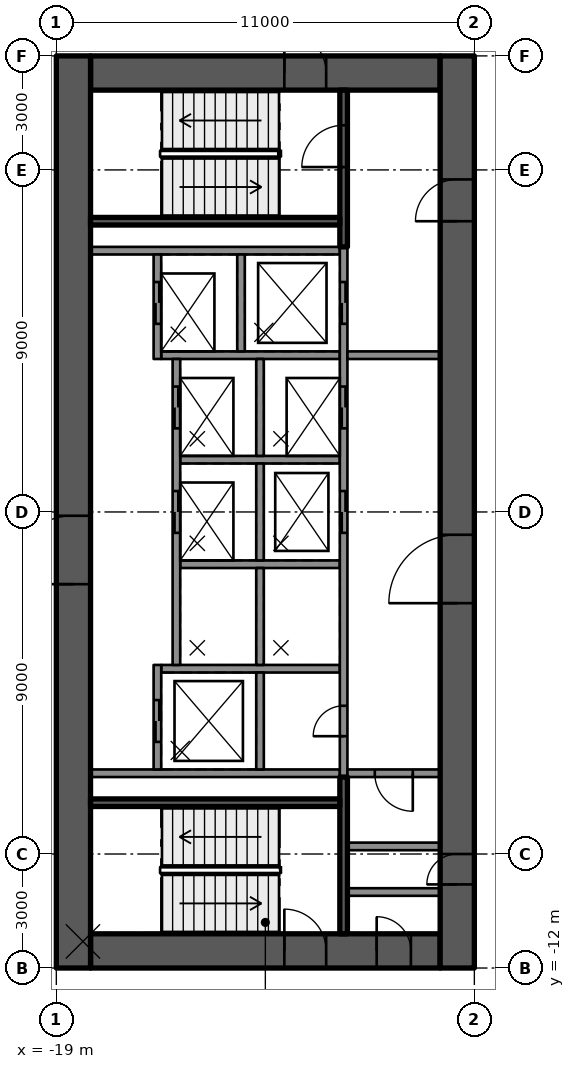
"""IFC4 building model, lengths in metres.
Left out: names, types, materials, properties, quantities, classifications, styles, units other than length and angle.
Written with IfcOpenShell. Run it as: python <this file> out.ifc"""

import sys

from ifc_helpers import new_model, si_unit, direction, frame, frame_2d, origin, place, context, subcontext, project, spatial, rectangle, extrude, element, fill, save


model = new_model("IFC4")
c1 = context("Model", 3, precision=1e-05, world=origin(), true_north=direction((0.0, 1.0)))
c2 = subcontext(c1, "Body", "Model", "MODEL_VIEW")
j1 = project(units=[si_unit("LENGTHUNIT", "METRE"), si_unit("PLANEANGLEUNIT", "RADIAN")], contexts=[c1])
p1 = place(None, origin())
s1 = spatial("IfcSite", under=j1, at=p1, CompositionType="ELEMENT")
p2 = place(p1, origin())
s2 = spatial("IfcBuilding", under=s1, at=p2, CompositionType="ELEMENT")
p3 = place(p2, frame((0.0, 0.0, 54.8)))
s3 = spatial("IfcBuildingStorey", under=s2, at=p3, CompositionType="ELEMENT", Elevation=54.8)
p4 = place(p3, frame((-18.1, 11.55, 0.0), z_axis=(0.0, 0.0, 1.0), x_axis=(1.0, 0.0, 0.0)))
e1 = element("IfcWall", 1, at=p4, inside=s3, PredefinedType="SHEAR", context=c2, shape_type="SweptSolid", body=[
    extrude(rectangle(XDim=9.2, YDim=0.9, at=frame_2d((4.6, 0.0))), origin(), (0.0, 0.0, 1.0), 4.0),
])
p5 = place(p4, frame((5.1, 0.0, 0.0)))
e2 = element("IfcOpeningElement", 2, at=p5, cuts=e1, PredefinedType="OPENING", context=c2, shape_type="SweptSolid", body=[
    extrude(rectangle(XDim=1.1, YDim=2.1, at=frame_2d((0.55, 1.05))), frame((0.0, 0.46, 0.0), z_axis=(0.0, -1.0, 0.0), x_axis=(1.0, 0.0, 0.0)), (0.0, 0.0, 1.0), 0.92),
])
p6 = place(p3, frame((-18.1, -11.55, 0.0), z_axis=(0.0, 0.0, 1.0), x_axis=(1.0, 0.0, 0.0)))
e3 = element("IfcWall", 3, at=p6, inside=s3, PredefinedType="SHEAR", context=c2, shape_type="SweptSolid", body=[
    extrude(rectangle(XDim=9.2, YDim=0.9, at=frame_2d((4.6, 0.0))), origin(), (0.0, 0.0, 1.0), 4.0),
])
p7 = place(p6, frame((5.1, 0.0, 0.0)))
e4 = element("IfcOpeningElement", 4, at=p7, cuts=e3, PredefinedType="OPENING", context=c2, shape_type="SweptSolid", body=[
    extrude(rectangle(XDim=1.1, YDim=2.1, at=frame_2d((0.55, 1.05))), frame((0.0, 0.46, 0.0), z_axis=(0.0, -1.0, 0.0), x_axis=(1.0, 0.0, 0.0)), (0.0, 0.0, 1.0), 0.92),
])
p8 = place(p6, frame((7.53, 0.0, 0.0)))
e5 = element("IfcOpeningElement", 5, at=p8, cuts=e3, PredefinedType="OPENING", context=c2, shape_type="SweptSolid", body=[
    extrude(rectangle(XDim=0.9, YDim=2.1, at=frame_2d((0.45, 1.05))), frame((0.0, 0.46, 0.0), z_axis=(0.0, -1.0, 0.0), x_axis=(1.0, 0.0, 0.0)), (0.0, 0.0, 1.0), 0.92),
])
p9 = place(p3, frame((-18.55, -12.0, 0.0), z_axis=(0.0, 0.0, 1.0), x_axis=(0.0, 1.0, 0.0)))
e6 = element("IfcWall", 6, at=p9, inside=s3, PredefinedType="SHEAR", context=c2, shape_type="SweptSolid", body=[
    extrude(rectangle(XDim=24.0, YDim=0.9, at=frame_2d((12.0, 0.0))), origin(), (0.0, 0.0, 1.0), 4.0),
])
p10 = place(p9, frame((10.1, 0.0, 0.0)))
e7 = element("IfcOpeningElement", 7, at=p10, cuts=e6, PredefinedType="OPENING", context=c2, shape_type="SweptSolid", body=[
    extrude(rectangle(XDim=1.8, YDim=2.1, at=frame_2d((0.9, 1.05))), frame((0.0, 0.46, 0.0), z_axis=(0.0, -1.0, 0.0), x_axis=(1.0, 0.0, 0.0)), (0.0, 0.0, 1.0), 0.92),
])
p11 = place(p3, frame((-8.45, -12.0, 0.0), z_axis=(0.0, 0.0, 1.0), x_axis=(0.0, 1.0, 0.0)))
e8 = element("IfcWall", 8, at=p11, inside=s3, PredefinedType="SHEAR", context=c2, shape_type="SweptSolid", body=[
    extrude(rectangle(XDim=24.0, YDim=0.9, at=frame_2d((12.0, 0.0))), origin(), (0.0, 0.0, 1.0), 4.0),
])
p12 = place(p11, frame((9.6, 0.0, 0.0)))
e9 = element("IfcOpeningElement", 9, at=p12, cuts=e8, PredefinedType="OPENING", context=c2, shape_type="SweptSolid", body=[
    extrude(rectangle(XDim=1.8, YDim=2.1, at=frame_2d((0.9, 1.05))), frame((0.0, 0.46, 0.0), z_axis=(0.0, -1.0, 0.0), x_axis=(1.0, 0.0, 0.0)), (0.0, 0.0, 1.0), 0.92),
])
p13 = place(p11, frame((19.65, 0.0, 0.0)))
e10 = element("IfcOpeningElement", 10, at=p13, cuts=e8, PredefinedType="OPENING", context=c2, shape_type="SweptSolid", body=[
    extrude(rectangle(XDim=1.1, YDim=2.1, at=frame_2d((0.55, 1.05))), frame((0.0, 0.46, 0.0), z_axis=(0.0, -1.0, 0.0), x_axis=(1.0, 0.0, 0.0)), (0.0, 0.0, 1.0), 0.92),
])
p14 = place(p11, frame((2.2, 0.0, 0.0)))
e11 = element("IfcOpeningElement", 11, at=p14, cuts=e8, PredefinedType="OPENING", context=c2, shape_type="SweptSolid", body=[
    extrude(rectangle(XDim=0.8, YDim=2.1, at=frame_2d((0.4, 1.05))), frame((0.0, 0.46, 0.0), z_axis=(0.0, -1.0, 0.0), x_axis=(1.0, 0.0, 0.0)), (0.0, 0.0, 1.0), 0.92),
])
for number, where, z_axis, x_axis in (
    (12, (-11.54, 6.875, 0.0), (0.0, 0.0, 1.0), (-1.0, 0.0, 0.0)),
    (13, (-11.54, -6.875, 0.0), (0.0, 0.0, 1.0), (-1.0, 0.0, 0.0)),
):
    element("IfcWall", number, at=place(p3, frame(where, z_axis=z_axis, x_axis=x_axis)), inside=s3, PredefinedType="SOLIDWALL", context=c2, shape_type="SweptSolid", body=[
        extrude(rectangle(XDim=6.56, YDim=0.2, at=frame_2d((3.28, 0.0))), origin(), (0.0, 0.0, 1.0), 3.59),
    ])
p15 = place(p3, frame((-11.54, -4.125, 0.0), z_axis=(0.0, 0.0, 1.0), x_axis=(-1.0, 0.0, 0.0)))
e14 = element("IfcWall", 14, at=p15, inside=s3, PredefinedType="SOLIDWALL", context=c2, shape_type="SweptSolid", body=[
    extrude(rectangle(XDim=4.7, YDim=0.2, at=frame_2d((2.35, 0.0))), origin(), (0.0, 0.0, 1.0), 3.59),
])
for number, where, z_axis, x_axis in (
    (15, (-11.54, -1.375, 0.0), (0.0, 0.0, 1.0), (-1.0, 0.0, 0.0)),
    (16, (-11.54, 1.375, 0.0), (0.0, 0.0, 1.0), (-1.0, 0.0, 0.0)),
):
    element("IfcWall", number, at=place(p3, frame(where, z_axis=z_axis, x_axis=x_axis)), inside=s3, PredefinedType="SOLIDWALL", context=c2, shape_type="SweptSolid", body=[
        extrude(rectangle(XDim=4.2, YDim=0.2, at=frame_2d((2.1, 0.0))), origin(), (0.0, 0.0, 1.0), 3.59),
    ])
p16 = place(p3, frame((-11.54, 4.125, 0.0), z_axis=(0.0, 0.0, 1.0), x_axis=(-1.0, 0.0, 0.0)))
e17 = element("IfcWall", 17, at=p16, inside=s3, PredefinedType="SOLIDWALL", context=c2, shape_type="SweptSolid", body=[
    extrude(rectangle(XDim=4.7, YDim=0.2, at=frame_2d((2.35, 0.0))), origin(), (0.0, 0.0, 1.0), 3.59),
])
p17 = place(p3, frame((-11.44, -6.975, 0.0), z_axis=(0.0, 0.0, 1.0), x_axis=(0.0, 1.0, 0.0)))
e18 = element("IfcWall", 18, at=p17, inside=s3, PredefinedType="SOLIDWALL", context=c2, shape_type="SweptSolid", body=[
    extrude(rectangle(XDim=13.95, YDim=0.2, at=frame_2d((6.975, 0.0))), origin(), (0.0, 0.0, 1.0), 3.59),
])
p18 = place(p17, frame((6.425, 0.0, 0.0)))
e19 = element("IfcOpeningElement", 19, at=p18, cuts=e18, PredefinedType="OPENING", context=c2, shape_type="SweptSolid", body=[
    extrude(rectangle(XDim=1.1, YDim=2.1, at=frame_2d((0.55, 1.05))), frame((0.0, 0.11, 0.0), z_axis=(0.0, -1.0, 0.0), x_axis=(1.0, 0.0, 0.0)), (0.0, 0.0, 1.0), 0.22),
])
p19 = place(p17, frame((9.175, 0.0, 0.0)))
e20 = element("IfcOpeningElement", 20, at=p19, cuts=e18, PredefinedType="OPENING", context=c2, shape_type="SweptSolid", body=[
    extrude(rectangle(XDim=1.1, YDim=2.1, at=frame_2d((0.55, 1.05))), frame((0.0, 0.11, 0.0), z_axis=(0.0, -1.0, 0.0), x_axis=(1.0, 0.0, 0.0)), (0.0, 0.0, 1.0), 0.22),
])
p20 = place(p17, frame((11.925, 0.0, 0.0)))
e21 = element("IfcOpeningElement", 21, at=p20, cuts=e18, PredefinedType="OPENING", context=c2, shape_type="SweptSolid", body=[
    extrude(rectangle(XDim=1.1, YDim=2.1, at=frame_2d((0.55, 1.05))), frame((0.0, 0.11, 0.0), z_axis=(0.0, -1.0, 0.0), x_axis=(1.0, 0.0, 0.0)), (0.0, 0.0, 1.0), 0.22),
])
p21 = place(p17, frame((1.075, 0.0, 0.0)))
e22 = element("IfcOpeningElement", 22, at=p21, cuts=e18, PredefinedType="OPENING", context=c2, shape_type="SweptSolid", body=[
    extrude(rectangle(XDim=0.8, YDim=2.1, at=frame_2d((0.4, 1.05))), frame((0.0, 0.11, 0.0), z_axis=(0.0, -1.0, 0.0), x_axis=(1.0, 0.0, 0.0)), (0.0, 0.0, 1.0), 0.22),
])
for number, where, z_axis, x_axis in (
    (23, (-13.64, -6.775, 0.0), (0.0, 0.0, 1.0), (0.0, 1.0, 0.0)),
    (24, (-13.64, -4.025, 0.0), (0.0, 0.0, 1.0), (0.0, 1.0, 0.0)),
    (25, (-13.64, -1.275, 0.0), (0.0, 0.0, 1.0), (0.0, 1.0, 0.0)),
    (26, (-13.64, 1.475, 0.0), (0.0, 0.0, 1.0), (0.0, 1.0, 0.0)),
    (27, (-14.14, 4.225, 0.0), (0.0, 0.0, 1.0), (0.0, 1.0, 0.0)),
):
    element("IfcWall", number, at=place(p3, frame(where, z_axis=z_axis, x_axis=x_axis)), inside=s3, PredefinedType="SOLIDWALL", context=c2, shape_type="SweptSolid", body=[
        extrude(rectangle(XDim=2.55, YDim=0.2, at=frame_2d((1.275, 0.0))), origin(), (0.0, 0.0, 1.0), 3.59),
    ])
p22 = place(p3, frame((-16.34, -6.775, 0.0), z_axis=(0.0, 0.0, 1.0), x_axis=(0.0, 1.0, 0.0)))
e28 = element("IfcWall", 28, at=p22, inside=s3, PredefinedType="SOLIDWALL", context=c2, shape_type="SweptSolid", body=[
    extrude(rectangle(XDim=2.75, YDim=0.2, at=frame_2d((1.375, 0.0))), origin(), (0.0, 0.0, 1.0), 3.59),
])
p23 = place(p22, frame((0.725, 0.0, 0.0)))
e29 = element("IfcOpeningElement", 29, at=p23, cuts=e28, PredefinedType="OPENING", context=c2, shape_type="SweptSolid", body=[
    extrude(rectangle(XDim=1.1, YDim=2.1, at=frame_2d((0.55, 1.05))), frame((0.0, 0.11, 0.0), z_axis=(0.0, -1.0, 0.0), x_axis=(1.0, 0.0, 0.0)), (0.0, 0.0, 1.0), 0.22),
])
p24 = place(p3, frame((-15.84, -4.025, 0.0), z_axis=(0.0, 0.0, 1.0), x_axis=(0.0, 1.0, 0.0)))
e30 = element("IfcWall", 30, at=p24, inside=s3, PredefinedType="SOLIDWALL", context=c2, shape_type="SweptSolid", body=[
    extrude(rectangle(XDim=8.05, YDim=0.2, at=frame_2d((4.025, 0.0))), origin(), (0.0, 0.0, 1.0), 3.59),
])
p25 = place(p24, frame((3.475, 0.0, 0.0)))
e31 = element("IfcOpeningElement", 31, at=p25, cuts=e30, PredefinedType="OPENING", context=c2, shape_type="SweptSolid", body=[
    extrude(rectangle(XDim=1.1, YDim=2.1, at=frame_2d((0.55, 1.05))), frame((0.0, 0.11, 0.0), z_axis=(0.0, -1.0, 0.0), x_axis=(1.0, 0.0, 0.0)), (0.0, 0.0, 1.0), 0.22),
])
p26 = place(p24, frame((6.225, 0.0, 0.0)))
e32 = element("IfcOpeningElement", 32, at=p26, cuts=e30, PredefinedType="OPENING", context=c2, shape_type="SweptSolid", body=[
    extrude(rectangle(XDim=1.1, YDim=2.1, at=frame_2d((0.55, 1.05))), frame((0.0, 0.11, 0.0), z_axis=(0.0, -1.0, 0.0), x_axis=(1.0, 0.0, 0.0)), (0.0, 0.0, 1.0), 0.22),
])
p27 = place(p3, frame((-16.34, 4.025, 0.0), z_axis=(0.0, 0.0, 1.0), x_axis=(0.0, 1.0, 0.0)))
e33 = element("IfcWall", 33, at=p27, inside=s3, PredefinedType="SOLIDWALL", context=c2, shape_type="SweptSolid", body=[
    extrude(rectangle(XDim=2.75, YDim=0.2, at=frame_2d((1.375, 0.0))), origin(), (0.0, 0.0, 1.0), 3.59),
])
p28 = place(p27, frame((0.925, 0.0, 0.0)))
e34 = element("IfcOpeningElement", 34, at=p28, cuts=e33, PredefinedType="OPENING", context=c2, shape_type="SweptSolid", body=[
    extrude(rectangle(XDim=1.1, YDim=2.1, at=frame_2d((0.55, 1.05))), frame((0.0, 0.11, 0.0), z_axis=(0.0, -1.0, 0.0), x_axis=(1.0, 0.0, 0.0)), (0.0, 0.0, 1.0), 0.22),
])
p29 = place(p3, frame((-11.44, 6.975, 0.0), z_axis=(0.0, 0.0, 1.0), x_axis=(0.0, 1.0, 0.0)))
e35 = element("IfcWall", 35, at=p29, inside=s3, PredefinedType="SOLIDWALL", context=c2, shape_type="SweptSolid", body=[
    extrude(rectangle(XDim=4.125, YDim=0.2, at=frame_2d((2.062, 0.0))), origin(), (0.0, 0.0, 1.0), 3.59),
])
p30 = place(p29, frame((2.1, 0.0, 0.0)))
e36 = element("IfcOpeningElement", 36, at=p30, cuts=e35, PredefinedType="OPENING", context=c2, shape_type="SweptSolid", body=[
    extrude(rectangle(XDim=1.1, YDim=2.1, at=frame_2d((0.55, 1.05))), frame((0.0, 0.11, 0.0), z_axis=(0.0, -1.0, 0.0), x_axis=(1.0, 0.0, 0.0)), (0.0, 0.0, 1.0), 0.22),
])
p31 = place(p3, frame((-11.54, 7.65, 0.0), z_axis=(0.0, 0.0, 1.0), x_axis=(-1.0, 0.0, 0.0)))
e37 = element("IfcWall", 37, at=p31, inside=s3, PredefinedType="SOLIDWALL", context=c2, shape_type="SweptSolid", body=[
    extrude(rectangle(XDim=6.56, YDim=0.2, at=frame_2d((3.28, 0.0))), origin(), (0.0, 0.0, 1.0), 3.59),
])
p32 = place(p3, frame((-11.44, -11.1, 0.0), z_axis=(0.0, 0.0, 1.0), x_axis=(0.0, 1.0, 0.0)))
e38 = element("IfcWall", 38, at=p32, inside=s3, PredefinedType="SOLIDWALL", context=c2, shape_type="SweptSolid", body=[
    extrude(rectangle(XDim=4.125, YDim=0.2, at=frame_2d((2.062, 0.0))), origin(), (0.0, 0.0, 1.0), 3.59),
])
p33 = place(p3, frame((-11.54, -7.65, 0.0), z_axis=(0.0, 0.0, 1.0), x_axis=(-1.0, 0.0, 0.0)))
e39 = element("IfcWall", 39, at=p33, inside=s3, PredefinedType="SOLIDWALL", context=c2, shape_type="SweptSolid", body=[
    extrude(rectangle(XDim=6.56, YDim=0.2, at=frame_2d((3.28, 0.0))), origin(), (0.0, 0.0, 1.0), 3.59),
])
p34 = place(p3, frame((-8.9, 4.125, 0.0), z_axis=(0.0, 0.0, 1.0), x_axis=(-1.0, 0.0, 0.0)))
e40 = element("IfcWall", 40, at=p34, inside=s3, PredefinedType="PARTITIONING", context=c2, shape_type="SweptSolid", body=[
    extrude(rectangle(XDim=2.44, YDim=0.2, at=frame_2d((1.22, 0.0))), origin(), (0.0, 0.0, 1.0), 3.59),
])
p35 = place(p3, frame((-8.9, -6.875, 0.0), z_axis=(0.0, 0.0, 1.0), x_axis=(-1.0, 0.0, 0.0)))
e41 = element("IfcWall", 41, at=p35, inside=s3, PredefinedType="PARTITIONING", context=c2, shape_type="SweptSolid", body=[
    extrude(rectangle(XDim=2.44, YDim=0.2, at=frame_2d((1.22, 0.0))), origin(), (0.0, 0.0, 1.0), 3.59),
])
p36 = place(p35, frame((0.72, 0.0, 0.0)))
e42 = element("IfcOpeningElement", 42, at=p36, cuts=e41, PredefinedType="OPENING", context=c2, shape_type="SweptSolid", body=[
    extrude(rectangle(XDim=1.0, YDim=2.1, at=frame_2d((0.5, 1.05))), frame((0.0, 0.11, 0.0), z_axis=(0.0, -1.0, 0.0), x_axis=(1.0, 0.0, 0.0)), (0.0, 0.0, 1.0), 0.22),
])
for number, where, z_axis, x_axis in (
    (43, (-8.9, -10.0, 0.0), (0.0, 0.0, 1.0), (-1.0, 0.0, 0.0)),
    (44, (-8.9, -8.8, 0.0), (0.0, 0.0, 1.0), (-1.0, 0.0, 0.0)),
):
    element("IfcWall", number, at=place(p3, frame(where, z_axis=z_axis, x_axis=x_axis)), inside=s3, PredefinedType="PARTITIONING", context=c2, shape_type="SweptSolid", body=[
        extrude(rectangle(XDim=2.44, YDim=0.2, at=frame_2d((1.22, 0.0))), origin(), (0.0, 0.0, 1.0), 3.59),
    ])
p37 = place(p23, origin())
e45 = element("IfcDoor", 45, at=p37, inside=s3, OperationType="DOUBLE_DOOR_SLIDING", PredefinedType="DOOR", context=c2, shape_type="SweptSolid", body=[
    extrude(rectangle(XDim=1.1, YDim=2.1, at=frame_2d((0.55, 1.05))), frame((0.0, 0.025, 0.0), z_axis=(0.0, -1.0, 0.0), x_axis=(1.0, 0.0, 0.0)), (0.0, 0.0, 1.0), 0.05),
])
fill(e29, e45)
p38 = place(p18, origin())
e46 = element("IfcDoor", 46, at=p38, inside=s3, OperationType="DOUBLE_DOOR_SLIDING", PredefinedType="DOOR", context=c2, shape_type="SweptSolid", body=[
    extrude(rectangle(XDim=1.1, YDim=2.1, at=frame_2d((0.55, 1.05))), frame((0.0, 0.025, 0.0), z_axis=(0.0, -1.0, 0.0), x_axis=(1.0, 0.0, 0.0)), (0.0, 0.0, 1.0), 0.05),
])
fill(e19, e46)
p39 = place(p25, origin())
e47 = element("IfcDoor", 47, at=p39, inside=s3, OperationType="DOUBLE_DOOR_SLIDING", PredefinedType="DOOR", context=c2, shape_type="SweptSolid", body=[
    extrude(rectangle(XDim=1.1, YDim=2.1, at=frame_2d((0.55, 1.05))), frame((0.0, 0.025, 0.0), z_axis=(0.0, -1.0, 0.0), x_axis=(1.0, 0.0, 0.0)), (0.0, 0.0, 1.0), 0.05),
])
fill(e31, e47)
p40 = place(p19, origin())
e48 = element("IfcDoor", 48, at=p40, inside=s3, OperationType="DOUBLE_DOOR_SLIDING", PredefinedType="DOOR", context=c2, shape_type="SweptSolid", body=[
    extrude(rectangle(XDim=1.1, YDim=2.1, at=frame_2d((0.55, 1.05))), frame((0.0, 0.025, 0.0), z_axis=(0.0, -1.0, 0.0), x_axis=(1.0, 0.0, 0.0)), (0.0, 0.0, 1.0), 0.05),
])
fill(e20, e48)
p41 = place(p26, origin())
e49 = element("IfcDoor", 49, at=p41, inside=s3, OperationType="DOUBLE_DOOR_SLIDING", PredefinedType="DOOR", context=c2, shape_type="SweptSolid", body=[
    extrude(rectangle(XDim=1.1, YDim=2.1, at=frame_2d((0.55, 1.05))), frame((0.0, 0.025, 0.0), z_axis=(0.0, -1.0, 0.0), x_axis=(1.0, 0.0, 0.0)), (0.0, 0.0, 1.0), 0.05),
])
fill(e32, e49)
p42 = place(p20, origin())
e50 = element("IfcDoor", 50, at=p42, inside=s3, OperationType="DOUBLE_DOOR_SLIDING", PredefinedType="DOOR", context=c2, shape_type="SweptSolid", body=[
    extrude(rectangle(XDim=1.1, YDim=2.1, at=frame_2d((0.55, 1.05))), frame((0.0, 0.025, 0.0), z_axis=(0.0, -1.0, 0.0), x_axis=(1.0, 0.0, 0.0)), (0.0, 0.0, 1.0), 0.05),
])
fill(e21, e50)
p43 = place(p28, origin())
e51 = element("IfcDoor", 51, at=p43, inside=s3, OperationType="DOUBLE_DOOR_SLIDING", PredefinedType="DOOR", context=c2, shape_type="SweptSolid", body=[
    extrude(rectangle(XDim=1.1, YDim=2.1, at=frame_2d((0.55, 1.05))), frame((0.0, 0.025, 0.0), z_axis=(0.0, -1.0, 0.0), x_axis=(1.0, 0.0, 0.0)), (0.0, 0.0, 1.0), 0.05),
])
fill(e34, e51)
p44 = place(p21, origin())
e52 = element("IfcDoor", 52, at=p44, inside=s3, OperationType="SINGLE_SWING_LEFT", PredefinedType="DOOR", context=c2, shape_type="SweptSolid", body=[
    extrude(rectangle(XDim=0.8, YDim=2.1, at=frame_2d((0.4, 1.05))), frame((0.0, 0.025, 0.0), z_axis=(0.0, -1.0, 0.0), x_axis=(1.0, 0.0, 0.0)), (0.0, 0.0, 1.0), 0.05),
])
fill(e22, e52)
p45 = place(p12, origin())
e53 = element("IfcDoor", 53, at=p45, inside=s3, OperationType="SINGLE_SWING_LEFT", PredefinedType="DOOR", context=c2, shape_type="SweptSolid", body=[
    extrude(rectangle(XDim=1.8, YDim=2.1, at=frame_2d((0.9, 1.05))), frame((0.0, 0.025, 0.0), z_axis=(0.0, -1.0, 0.0), x_axis=(1.0, 0.0, 0.0)), (0.0, 0.0, 1.0), 0.05),
])
fill(e9, e53)
p46 = place(p10, origin())
e54 = element("IfcDoor", 54, at=p46, inside=s3, OperationType="SINGLE_SWING_LEFT", PredefinedType="DOOR", context=c2, shape_type="SweptSolid", body=[
    extrude(rectangle(XDim=1.8, YDim=2.1, at=frame_2d((0.9, 1.05))), frame((0.0, 0.025, 0.0), z_axis=(0.0, -1.0, 0.0), x_axis=(1.0, 0.0, 0.0)), (0.0, 0.0, 1.0), 0.05),
])
fill(e7, e54)
p47 = place(p13, origin())
e55 = element("IfcDoor", 55, at=p47, inside=s3, OperationType="SINGLE_SWING_RIGHT", PredefinedType="DOOR", context=c2, shape_type="SweptSolid", body=[
    extrude(rectangle(XDim=1.1, YDim=2.1, at=frame_2d((0.55, 1.05))), frame((0.0, 0.025, 0.0), z_axis=(0.0, -1.0, 0.0), x_axis=(1.0, 0.0, 0.0)), (0.0, 0.0, 1.0), 0.05),
])
fill(e10, e55)
p48 = place(p5, origin())
e56 = element("IfcDoor", 56, at=p48, inside=s3, OperationType="SINGLE_SWING_RIGHT", PredefinedType="DOOR", context=c2, shape_type="SweptSolid", body=[
    extrude(rectangle(XDim=1.1, YDim=2.1, at=frame_2d((0.55, 1.05))), frame((0.0, 0.025, 0.0), z_axis=(0.0, -1.0, 0.0), x_axis=(1.0, 0.0, 0.0)), (0.0, 0.0, 1.0), 0.05),
])
fill(e2, e56)
p49 = place(p7, origin())
e57 = element("IfcDoor", 57, at=p49, inside=s3, OperationType="SINGLE_SWING_RIGHT", PredefinedType="DOOR", context=c2, shape_type="SweptSolid", body=[
    extrude(rectangle(XDim=1.1, YDim=2.1, at=frame_2d((0.55, 1.05))), frame((0.0, 0.025, 0.0), z_axis=(0.0, -1.0, 0.0), x_axis=(1.0, 0.0, 0.0)), (0.0, 0.0, 1.0), 0.05),
])
fill(e4, e57)
p50 = place(p30, origin())
e58 = element("IfcDoor", 58, at=p50, inside=s3, OperationType="SINGLE_SWING_RIGHT", PredefinedType="DOOR", context=c2, shape_type="SweptSolid", body=[
    extrude(rectangle(XDim=1.1, YDim=2.1, at=frame_2d((0.55, 1.05))), frame((0.0, 0.025, 0.0), z_axis=(0.0, -1.0, 0.0), x_axis=(1.0, 0.0, 0.0)), (0.0, 0.0, 1.0), 0.05),
])
fill(e36, e58)
p51 = place(p8, origin())
e59 = element("IfcDoor", 59, at=p51, inside=s3, OperationType="SINGLE_SWING_RIGHT", PredefinedType="DOOR", context=c2, shape_type="SweptSolid", body=[
    extrude(rectangle(XDim=0.9, YDim=2.1, at=frame_2d((0.45, 1.05))), frame((0.0, 0.025, 0.0), z_axis=(0.0, -1.0, 0.0), x_axis=(1.0, 0.0, 0.0)), (0.0, 0.0, 1.0), 0.05),
])
fill(e5, e59)
p52 = place(p14, origin())
e60 = element("IfcDoor", 60, at=p52, inside=s3, OperationType="SINGLE_SWING_LEFT", PredefinedType="DOOR", context=c2, shape_type="SweptSolid", body=[
    extrude(rectangle(XDim=0.8, YDim=2.1, at=frame_2d((0.4, 1.05))), frame((0.0, 0.025, 0.0), z_axis=(0.0, -1.0, 0.0), x_axis=(1.0, 0.0, 0.0)), (0.0, 0.0, 1.0), 0.05),
])
fill(e11, e60)
p53 = place(p36, origin())
e61 = element("IfcDoor", 61, at=p53, inside=s3, OperationType="SINGLE_SWING_RIGHT", PredefinedType="DOOR", context=c2, shape_type="SweptSolid", body=[
    extrude(rectangle(XDim=1.0, YDim=2.1, at=frame_2d((0.5, 1.05))), frame((0.0, 0.025, 0.0), z_axis=(0.0, -1.0, 0.0), x_axis=(1.0, 0.0, 0.0)), (0.0, 0.0, 1.0), 0.05),
])
fill(e42, e61)
save(model, sys.argv[1])
